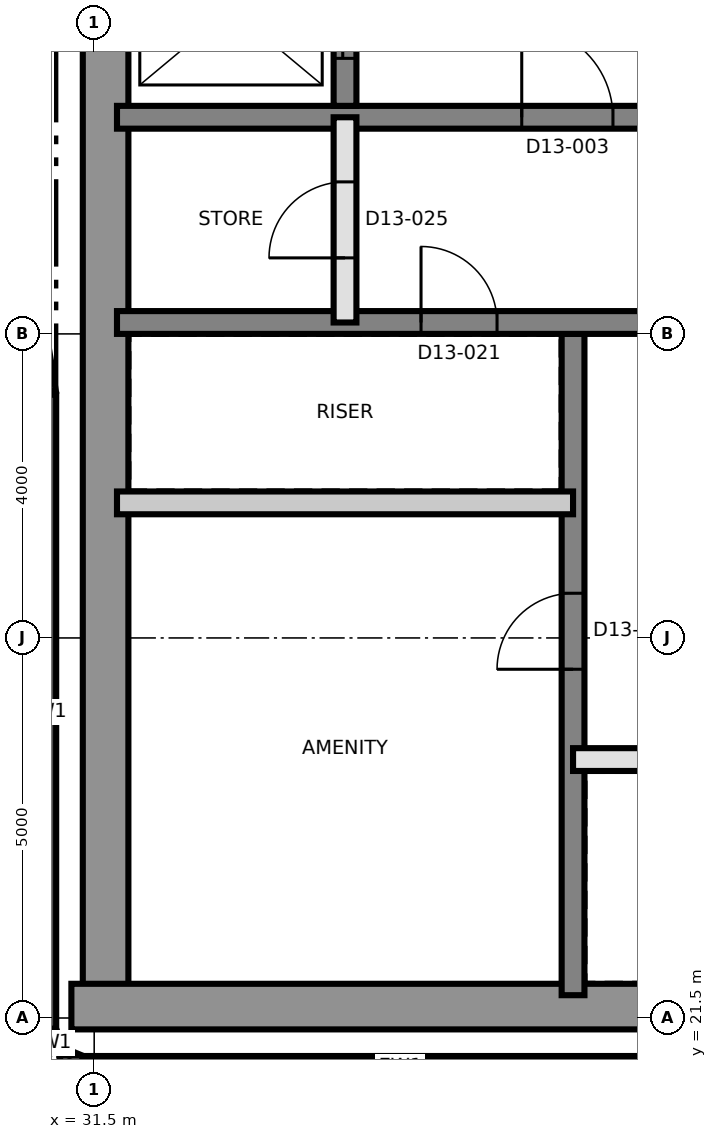
"""IFC4 building model, lengths in metres.
Left out: names, types, materials, properties, quantities, classifications, styles, units other than length and angle.
Written with IfcOpenShell. Run it as: python <this file> out.ifc"""

import sys

from ifc_helpers import new_model, si_unit, direction, frame, frame_2d, origin, place, context, subcontext, project, spatial, rectangle, extrude, element, fill, save


model = new_model("IFC4")
c1 = context("Model", 3, precision=1e-05, world=origin(), true_north=direction((0.0, 1.0)))
c2 = subcontext(c1, "Body", "Model", "MODEL_VIEW")
j1 = project(units=[si_unit("LENGTHUNIT", "METRE"), si_unit("PLANEANGLEUNIT", "RADIAN")], contexts=[c1])
p1 = place(None, origin())
s1 = spatial("IfcSite", under=j1, at=p1, CompositionType="ELEMENT")
p2 = place(p1, origin())
s2 = spatial("IfcBuilding", under=s1, at=p2, CompositionType="ELEMENT")
p3 = place(p2, frame((0.0, 0.0, 145.9)))
s3 = spatial("IfcBuildingStorey", under=s2, at=p3, CompositionType="ELEMENT", Elevation=145.9)
p4 = place(p3, frame((31.65, 21.8, 0.0), z_axis=(0.0, 0.0, 1.0), x_axis=(0.0, 1.0, 0.0)))
e1 = element("IfcWall", 1, at=p4, inside=s3, PredefinedType="SHEAR", context=c2, shape_type="SweptSolid", body=[
    extrude(rectangle(XDim=17.4, YDim=0.6, at=frame_2d((8.7, 0.0))), origin(), (0.0, 0.0, 1.0), 3.7),
])
p5 = place(p3, frame((31.2, 21.65, 0.0), z_axis=(0.0, 0.0, 1.0), x_axis=(1.0, 0.0, 0.0)))
e2 = element("IfcWall", 2, at=p5, inside=s3, PredefinedType="SHEAR", context=c2, shape_type="SweptSolid", body=[
    extrude(rectangle(XDim=27.0, YDim=0.6, at=frame_2d((13.5, 0.0))), origin(), (0.0, 0.0, 1.0), 3.7),
])
p6 = place(p3, frame((37.8, 21.8, 0.0), z_axis=(0.0, 0.0, 1.0), x_axis=(0.0, 1.0, 0.0)))
e3 = element("IfcWall", 3, at=p6, inside=s3, PredefinedType="SHEAR", context=c2, shape_type="SweptSolid", body=[
    extrude(rectangle(XDim=8.7, YDim=0.3, at=frame_2d((4.35, 0.0))), origin(), (0.0, 0.0, 1.0), 3.7),
])
p7 = place(p6, frame((4.288, 0.0, 0.0)))
e4 = element("IfcOpeningElement", 4, at=p7, cuts=e3, PredefinedType="OPENING", context=c2, shape_type="SweptSolid", body=[
    extrude(rectangle(XDim=1.0, YDim=2.1, at=frame_2d((0.5, 1.05))), frame((0.0, 0.16, 0.0), z_axis=(0.0, -1.0, 0.0), x_axis=(1.0, 0.0, 0.0)), (0.0, 0.0, 1.0), 0.32),
])
p8 = place(p3, frame((31.8, 30.65, 0.0), z_axis=(0.0, 0.0, 1.0), x_axis=(1.0, 0.0, 0.0)))
e5 = element("IfcWall", 5, at=p8, inside=s3, PredefinedType="SHEAR", context=c2, shape_type="SweptSolid", body=[
    extrude(rectangle(XDim=26.4, YDim=0.3, at=frame_2d((13.2, 0.0))), origin(), (0.0, 0.0, 1.0), 3.7),
])
p9 = place(p8, frame((24.7, 0.0, 0.0)))
e6 = element("IfcOpeningElement", 6, at=p9, cuts=e5, PredefinedType="OPENING", context=c2, shape_type="SweptSolid", body=[
    extrude(rectangle(XDim=1.0, YDim=2.1, at=frame_2d((0.5, 1.05))), frame((0.0, 0.16, 0.0), z_axis=(0.0, -1.0, 0.0), x_axis=(1.0, 0.0, 0.0)), (0.0, 0.0, 1.0), 0.32),
])
p10 = place(p8, frame((4.0, 0.0, 0.0)))
e7 = element("IfcOpeningElement", 7, at=p10, cuts=e5, PredefinedType="OPENING", context=c2, shape_type="SweptSolid", body=[
    extrude(rectangle(XDim=1.0, YDim=2.1, at=frame_2d((0.5, 1.05))), frame((0.0, 0.16, 0.0), z_axis=(0.0, -1.0, 0.0), x_axis=(1.0, 0.0, 0.0)), (0.0, 0.0, 1.0), 0.32),
])
p11 = place(p3, frame((31.8, 33.35, 0.0), z_axis=(0.0, 0.0, 1.0), x_axis=(1.0, 0.0, 0.0)))
e8 = element("IfcWall", 8, at=p11, inside=s3, PredefinedType="SHEAR", context=c2, shape_type="SweptSolid", body=[
    extrude(rectangle(XDim=26.4, YDim=0.3, at=frame_2d((13.2, 0.0))), origin(), (0.0, 0.0, 1.0), 3.7),
])
p12 = place(p11, frame((13.85, 0.0, 0.0)))
e9 = element("IfcOpeningElement", 9, at=p12, cuts=e8, PredefinedType="OPENING", context=c2, shape_type="SweptSolid", body=[
    extrude(rectangle(XDim=1.4, YDim=2.1, at=frame_2d((0.7, 1.05))), frame((0.0, 0.16, 0.0), z_axis=(0.0, -1.0, 0.0), x_axis=(1.0, 0.0, 0.0)), (0.0, 0.0, 1.0), 0.32),
])
p13 = place(p11, frame((5.325, 0.0, 0.0)))
e10 = element("IfcOpeningElement", 10, at=p13, cuts=e8, PredefinedType="OPENING", context=c2, shape_type="SweptSolid", body=[
    extrude(rectangle(XDim=1.2, YDim=2.1, at=frame_2d((0.6, 1.05))), frame((0.0, 0.16, 0.0), z_axis=(0.0, -1.0, 0.0), x_axis=(1.0, 0.0, 0.0)), (0.0, 0.0, 1.0), 0.32),
])
p14 = place(p11, frame((19.875, 0.0, 0.0)))
e11 = element("IfcOpeningElement", 11, at=p14, cuts=e8, PredefinedType="OPENING", context=c2, shape_type="SweptSolid", body=[
    extrude(rectangle(XDim=1.2, YDim=2.1, at=frame_2d((0.6, 1.05))), frame((0.0, 0.16, 0.0), z_axis=(0.0, -1.0, 0.0), x_axis=(1.0, 0.0, 0.0)), (0.0, 0.0, 1.0), 0.32),
])
p15 = place(p3, frame((34.8, 33.5, 0.0), z_axis=(0.0, 0.0, 1.0), x_axis=(0.0, 1.0, 0.0)))
e12 = element("IfcWall", 12, at=p15, inside=s3, PredefinedType="SHEAR", context=c2, shape_type="SweptSolid", body=[
    extrude(rectangle(XDim=2.55, YDim=0.3, at=frame_2d((1.275, 0.0))), origin(), (0.0, 0.0, 1.0), 3.7),
])
p16 = place(p15, frame((0.625, 0.0, 0.0)))
e13 = element("IfcOpeningElement", 13, at=p16, cuts=e12, PredefinedType="OPENING", context=c2, shape_type="SweptSolid", body=[
    extrude(rectangle(XDim=1.3, YDim=2.4, at=frame_2d((0.65, 1.2))), frame((0.0, 0.16, 0.0), z_axis=(0.0, -1.0, 0.0), x_axis=(1.0, 0.0, 0.0)), (0.0, 0.0, 1.0), 0.32),
])
p17 = place(p3, frame((30.85, 29.699, 0.0), z_axis=(0.0, 0.0, 1.0), x_axis=(0.0, -1.0, 0.0)))
e14 = element("IfcWall", 14, at=p17, inside=s3, PredefinedType="SOLIDWALL", context=c2, shape_type="SweptSolid", body=[
    extrude(rectangle(XDim=8.34, YDim=0.3, at=frame_2d((4.17, 0.0))), origin(), (0.0, 0.0, 1.0), 3.4),
])
for number, where, z_axis, x_axis in (
    (15, (30.861, 21.302, 0.0), (0.0, 0.0, 1.0), (0.383, -0.924, 0.0)),
    (16, (31.048, 20.967, 0.0), (0.0, 0.0, 1.0), (0.924, -0.383, 0.0)),
):
    element("IfcWall", number, at=place(p3, frame(where, z_axis=z_axis, x_axis=x_axis)), inside=s3, PredefinedType="SOLIDWALL", context=c2, shape_type="SweptSolid", body=[
        extrude(rectangle(XDim=0.275, YDim=0.3, at=frame_2d((0.138, 0.0))), origin(), (0.0, 0.0, 1.0), 3.4),
    ])
p18 = place(p3, frame((31.36, 20.85, 0.0), z_axis=(0.0, 0.0, 1.0), x_axis=(1.0, 0.0, 0.0)))
e17 = element("IfcWall", 17, at=p18, inside=s3, PredefinedType="SOLIDWALL", context=c2, shape_type="SweptSolid", body=[
    extrude(rectangle(XDim=8.34, YDim=0.3, at=frame_2d((4.17, 0.0))), origin(), (0.0, 0.0, 1.0), 3.4),
])
p19 = place(p3, frame((30.152, 34.0, 0.0), z_axis=(0.0, 0.0, 1.0), x_axis=(0.160697303067, -0.987003736967, 0.0)))
e18 = element("IfcWall", 18, at=p19, inside=s3, PredefinedType="SOLIDWALL", context=c2, shape_type="SweptSolid", body=[
    extrude(rectangle(XDim=4.333, YDim=0.3, at=frame_2d((2.167, 0.0))), origin(), (0.0, 0.0, 1.0), 3.4),
])
p20 = place(p19, frame((0.366, 0.0, 0.9)))
e19 = element("IfcOpeningElement", 19, at=p20, cuts=e18, PredefinedType="OPENING", context=c2, shape_type="SweptSolid", body=[
    extrude(rectangle(XDim=3.6, YDim=1.7, at=frame_2d((1.8, 0.85))), frame((0.0, 0.16, 0.0), z_axis=(0.0, -1.0, 0.0), x_axis=(1.0, 0.0, 0.0)), (0.0, 0.0, 1.0), 0.32),
])
p21 = place(p3, frame((37.8, 24.9, 0.0), z_axis=(0.0, 0.0, 1.0), x_axis=(1.0, 0.0, 0.0)))
e20 = element("IfcWall", 20, at=p21, inside=s3, PredefinedType="SOLIDWALL", context=c2, shape_type="SweptSolid", body=[
    extrude(rectangle(XDim=12.0, YDim=0.3, at=frame_2d((6.0, 0.0))), origin(), (0.0, 0.0, 1.0), 3.4),
])
p22 = place(p21, frame((1.05, 0.0, 0.0)))
e21 = element("IfcOpeningElement", 21, at=p22, cuts=e20, PredefinedType="OPENING", context=c2, shape_type="SweptSolid", body=[
    extrude(rectangle(XDim=0.9, YDim=2.1, at=frame_2d((0.45, 1.05))), frame((0.0, 0.16, 0.0), z_axis=(0.0, -1.0, 0.0), x_axis=(1.0, 0.0, 0.0)), (0.0, 0.0, 1.0), 0.32),
])
p23 = place(p21, frame((10.05, 0.0, 0.0)))
e22 = element("IfcOpeningElement", 22, at=p23, cuts=e20, PredefinedType="OPENING", context=c2, shape_type="SweptSolid", body=[
    extrude(rectangle(XDim=0.9, YDim=2.1, at=frame_2d((0.45, 1.05))), frame((0.0, 0.16, 0.0), z_axis=(0.0, -1.0, 0.0), x_axis=(1.0, 0.0, 0.0)), (0.0, 0.0, 1.0), 0.32),
])
p24 = place(p21, frame((3.95, 0.0, 0.0)))
e23 = element("IfcOpeningElement", 23, at=p24, cuts=e20, PredefinedType="OPENING", context=c2, shape_type="SweptSolid", body=[
    extrude(rectangle(XDim=1.1, YDim=2.4, at=frame_2d((0.55, 1.2))), frame((0.0, 0.16, 0.0), z_axis=(0.0, -1.0, 0.0), x_axis=(1.0, 0.0, 0.0)), (0.0, 0.0, 1.0), 0.32),
])
p25 = place(p21, frame((6.95, 0.0, 0.0)))
e24 = element("IfcOpeningElement", 24, at=p25, cuts=e20, PredefinedType="OPENING", context=c2, shape_type="SweptSolid", body=[
    extrude(rectangle(XDim=1.1, YDim=2.4, at=frame_2d((0.55, 1.2))), frame((0.0, 0.16, 0.0), z_axis=(0.0, -1.0, 0.0), x_axis=(1.0, 0.0, 0.0)), (0.0, 0.0, 1.0), 0.32),
])
p26 = place(p3, frame((31.8, 28.277, 0.0), z_axis=(0.0, 0.0, 1.0), x_axis=(1.0, 0.0, 0.0)))
e25 = element("IfcWall", 25, at=p26, inside=s3, PredefinedType="PARTITIONING", context=c2, shape_type="SweptSolid", body=[
    extrude(rectangle(XDim=6.0, YDim=0.3, at=frame_2d((3.0, 0.0))), origin(), (0.0, 0.0, 1.0), 3.4),
])
p27 = place(p3, frame((34.8, 30.65, 0.0), z_axis=(0.0, 0.0, 1.0), x_axis=(0.0, 1.0, 0.0)))
e26 = element("IfcWall", 26, at=p27, inside=s3, PredefinedType="SOLIDWALL", context=c2, shape_type="SweptSolid", body=[
    extrude(rectangle(XDim=2.7, YDim=0.3, at=frame_2d((1.35, 0.0))), origin(), (0.0, 0.0, 1.0), 3.4),
])
p28 = place(p27, frame((0.85, 0.0, 0.0)))
e27 = element("IfcOpeningElement", 27, at=p28, cuts=e26, PredefinedType="OPENING", context=c2, shape_type="SweptSolid", body=[
    extrude(rectangle(XDim=1.0, YDim=2.1, at=frame_2d((0.5, 1.05))), frame((0.0, 0.16, 0.0), z_axis=(0.0, -1.0, 0.0), x_axis=(1.0, 0.0, 0.0)), (0.0, 0.0, 1.0), 0.32),
])
p29 = place(p13, origin())
e28 = element("IfcDoor", 28, at=p29, inside=s3, OperationType="SINGLE_SWING_LEFT", PredefinedType="DOOR", context=c2, shape_type="SweptSolid", body=[
    extrude(rectangle(XDim=1.2, YDim=2.1, at=frame_2d((0.6, 1.05))), frame((0.0, 0.025, 0.0), z_axis=(0.0, -1.0, 0.0), x_axis=(1.0, 0.0, 0.0)), (0.0, 0.0, 1.0), 0.05),
])
fill(e10, e28)
p30 = place(p16, origin())
e29 = element("IfcDoor", 29, at=p30, inside=s3, OperationType="SLIDING_TO_LEFT", PredefinedType="DOOR", context=c2, shape_type="SweptSolid", body=[
    extrude(rectangle(XDim=1.3, YDim=2.4, at=frame_2d((0.65, 1.2))), frame((0.0, 0.025, 0.0), z_axis=(0.0, -1.0, 0.0), x_axis=(1.0, 0.0, 0.0)), (0.0, 0.0, 1.0), 0.05),
])
fill(e13, e29)
p31 = place(p10, origin())
e30 = element("IfcDoor", 30, at=p31, inside=s3, OperationType="SINGLE_SWING_LEFT", PredefinedType="DOOR", context=c2, shape_type="SweptSolid", body=[
    extrude(rectangle(XDim=1.0, YDim=2.1, at=frame_2d((0.5, 1.05))), frame((0.0, 0.025, 0.0), z_axis=(0.0, -1.0, 0.0), x_axis=(1.0, 0.0, 0.0)), (0.0, 0.0, 1.0), 0.05),
])
fill(e7, e30)
p32 = place(p7, origin())
e31 = element("IfcDoor", 31, at=p32, inside=s3, OperationType="SINGLE_SWING_RIGHT", PredefinedType="DOOR", context=c2, shape_type="SweptSolid", body=[
    extrude(rectangle(XDim=1.0, YDim=2.1, at=frame_2d((0.5, 1.05))), frame((0.0, 0.025, 0.0), z_axis=(0.0, -1.0, 0.0), x_axis=(1.0, 0.0, 0.0)), (0.0, 0.0, 1.0), 0.05),
])
fill(e4, e31)
p33 = place(p28, origin())
e32 = element("IfcDoor", 32, at=p33, inside=s3, OperationType="SINGLE_SWING_LEFT", PredefinedType="DOOR", context=c2, shape_type="SweptSolid", body=[
    extrude(rectangle(XDim=1.0, YDim=2.1, at=frame_2d((0.5, 1.05))), frame((0.0, 0.025, 0.0), z_axis=(0.0, -1.0, 0.0), x_axis=(1.0, 0.0, 0.0)), (0.0, 0.0, 1.0), 0.05),
])
fill(e27, e32)
save(model, sys.argv[1])
